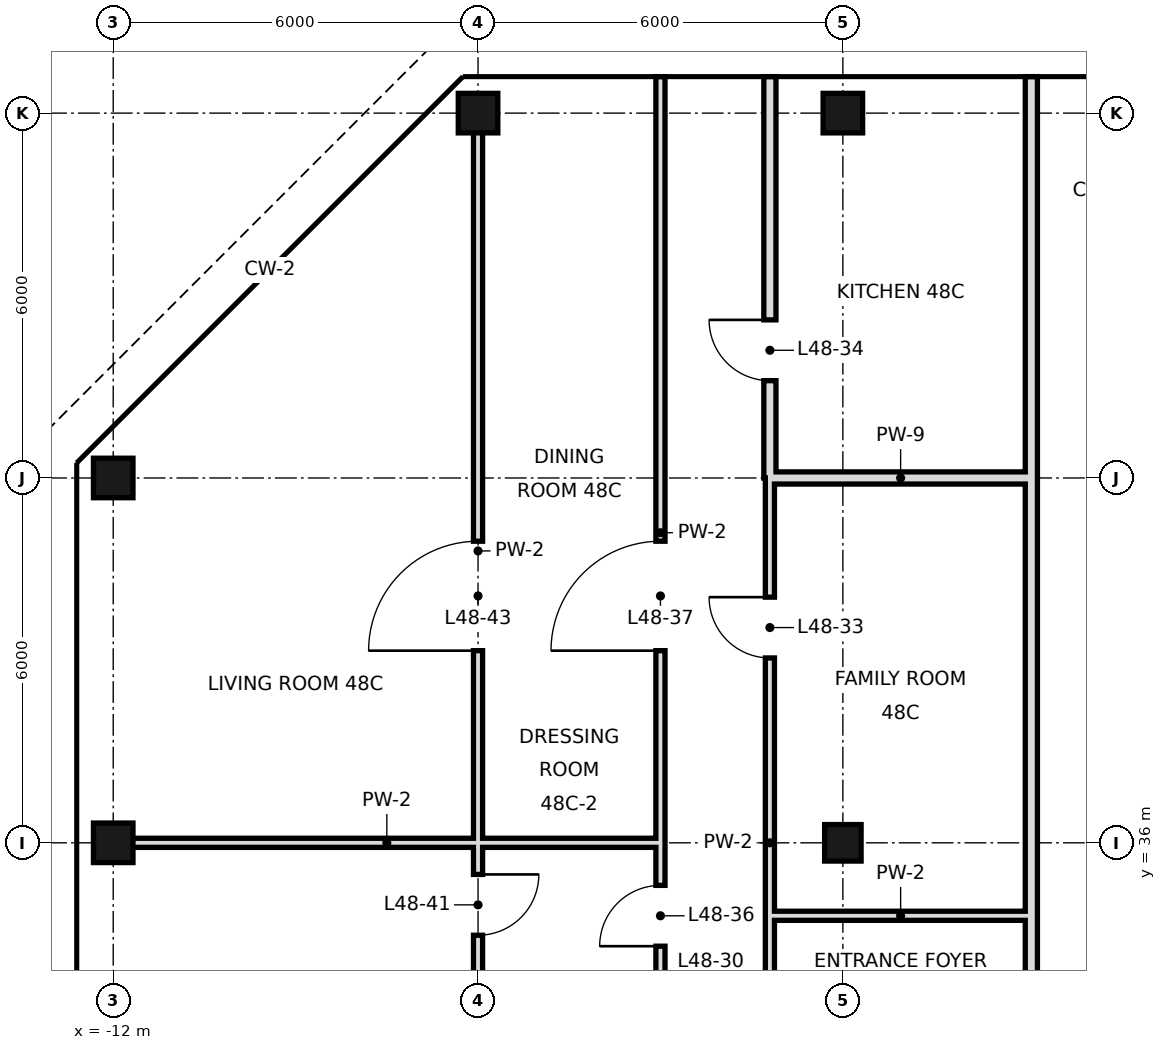
"""IFC4 building model, lengths in metres.
Left out: names, types, materials, properties, quantities, classifications, styles, units other than length and angle.
Written with IfcOpenShell. Run it as: python <this file> out.ifc"""

import sys

from ifc_helpers import new_model, si_unit, direction, frame, frame_2d, origin, origin_2d, place, context, subcontext, project, spatial, rectangle, hollow_rectangle, extrude, element, fill, save


model = new_model("IFC4")
c1 = context("Model", 3, precision=1e-05, world=origin(), true_north=direction((0.0, 1.0)))
c2 = subcontext(c1, "Body", "Model", "MODEL_VIEW")
j1 = project(units=[si_unit("LENGTHUNIT", "METRE"), si_unit("PLANEANGLEUNIT", "RADIAN")], contexts=[c1])
p1 = place(None, origin())
s1 = spatial("IfcSite", under=j1, at=p1, CompositionType="ELEMENT")
p2 = place(p1, origin())
s2 = spatial("IfcBuilding", under=s1, at=p2, CompositionType="ELEMENT")
p3 = place(p2, frame((0.0, 0.0, 206.4)))
s3 = spatial("IfcBuildingStorey", under=s2, at=p3, CompositionType="ELEMENT", Elevation=206.4)
for number, where, z_axis, x_axis in (
    (1, (-12.0, 36.0, 0.0), (0.0, 0.0, 1.0), (1.0, 0.0, 0.0)),
    (2, (-12.0, 42.0, 0.0), (0.0, 0.0, 1.0), (1.0, 0.0, 0.0)),
    (3, (-6.0, 48.0, 0.0), (0.0, 0.0, 1.0), (1.0, 0.0, 0.0)),
):
    element("IfcColumn", number, at=place(p3, frame(where, z_axis=z_axis, x_axis=x_axis)), inside=s3, PredefinedType="COLUMN", context=c2, shape_type="SweptSolid", body=[
        extrude(hollow_rectangle(XDim=0.65, YDim=0.65, WallThickness=0.032, at=origin_2d()), origin(), (0.0, 0.0, 1.0), 3.6),
    ])
p4 = place(p3, frame((0.0, 36.0, 0.0), z_axis=(0.0, 0.0, 1.0), x_axis=(1.0, 0.0, 0.0)))
e4 = element("IfcColumn", 4, at=p4, inside=s3, PredefinedType="COLUMN", context=c2, shape_type="SweptSolid", body=[
    extrude(hollow_rectangle(XDim=0.6, YDim=0.6, WallThickness=0.028, at=origin_2d()), origin(), (0.0, 0.0, 1.0), 3.6),
])
p5 = place(p3, frame((0.0, 48.0, 0.0), z_axis=(0.0, 0.0, 1.0), x_axis=(1.0, 0.0, 0.0)))
e5 = element("IfcColumn", 5, at=p5, inside=s3, PredefinedType="COLUMN", context=c2, shape_type="SweptSolid", body=[
    extrude(hollow_rectangle(XDim=0.65, YDim=0.65, WallThickness=0.032, at=origin_2d()), origin(), (0.0, 0.0, 1.0), 3.6),
])
p6 = place(p3, frame((-1.2, 42.0, 0.0), z_axis=(0.0, 0.0, 1.0), x_axis=(0.0, 1.0, 0.0)))
e6 = element("IfcWall", 6, at=p6, inside=s3, PredefinedType="SOLIDWALL", context=c2, shape_type="SweptSolid", body=[
    extrude(rectangle(XDim=6.6, YDim=0.2, at=frame_2d((3.3, 0.0))), origin(), (0.0, 0.0, 1.0), 2.68),
])
p7 = place(p6, frame((1.6, 0.0, 0.0)))
e7 = element("IfcOpeningElement", 7, at=p7, cuts=e6, PredefinedType="OPENING", context=c2, shape_type="SweptSolid", body=[
    extrude(rectangle(XDim=1.0, YDim=2.4, at=frame_2d((0.5, 1.2))), frame((0.0, 0.11, 0.0), z_axis=(0.0, -1.0, 0.0), x_axis=(1.0, 0.0, 0.0)), (0.0, 0.0, 1.0), 0.22),
])
p8 = place(p3, frame((-1.2, 30.0, 0.0), z_axis=(0.0, 0.0, 1.0), x_axis=(0.0, 1.0, 0.0)))
e8 = element("IfcWall", 8, at=p8, inside=s3, PredefinedType="PARTITIONING", context=c2, shape_type="SweptSolid", body=[
    extrude(rectangle(XDim=12.0, YDim=0.15, at=frame_2d((6.0, 0.0))), origin(), (0.0, 0.0, 1.0), 3.38),
])
p9 = place(p8, frame((2.56, 0.0, 0.0)))
e9 = element("IfcOpeningElement", 9, at=p9, cuts=e8, PredefinedType="OPENING", context=c2, shape_type="SweptSolid", body=[
    extrude(rectangle(XDim=1.0, YDim=2.4, at=frame_2d((0.5, 1.2))), frame((0.0, 0.085, 0.0), z_axis=(0.0, -1.0, 0.0), x_axis=(1.0, 0.0, 0.0)), (0.0, 0.0, 1.0), 0.17),
])
p10 = place(p8, frame((9.04, 0.0, 0.0)))
e10 = element("IfcOpeningElement", 10, at=p10, cuts=e8, PredefinedType="OPENING", context=c2, shape_type="SweptSolid", body=[
    extrude(rectangle(XDim=1.0, YDim=2.4, at=frame_2d((0.5, 1.2))), frame((0.0, 0.085, 0.0), z_axis=(0.0, -1.0, 0.0), x_axis=(1.0, 0.0, 0.0)), (0.0, 0.0, 1.0), 0.17),
])
p11 = place(p3, frame((-3.0, 33.6, 0.0), z_axis=(0.0, 0.0, 1.0), x_axis=(0.0, 1.0, 0.0)))
e11 = element("IfcWall", 11, at=p11, inside=s3, PredefinedType="PARTITIONING", context=c2, shape_type="SweptSolid", body=[
    extrude(rectangle(XDim=15.0, YDim=0.15, at=frame_2d((7.5, 0.0))), origin(), (0.0, 0.0, 1.0), 3.38),
])
p12 = place(p11, frame((0.7, 0.0, 0.0)))
e12 = element("IfcOpeningElement", 12, at=p12, cuts=e11, PredefinedType="OPENING", context=c2, shape_type="SweptSolid", body=[
    extrude(rectangle(XDim=1.0, YDim=2.4, at=frame_2d((0.5, 1.2))), frame((0.0, 0.085, 0.0), z_axis=(0.0, -1.0, 0.0), x_axis=(1.0, 0.0, 0.0)), (0.0, 0.0, 1.0), 0.17),
])
p13 = place(p11, frame((5.56, 0.0, 0.0)))
e13 = element("IfcOpeningElement", 13, at=p13, cuts=e11, PredefinedType="OPENING", context=c2, shape_type="SweptSolid", body=[
    extrude(rectangle(XDim=1.8, YDim=2.4, at=frame_2d((0.9, 1.2))), frame((0.0, 0.085, 0.0), z_axis=(0.0, -1.0, 0.0), x_axis=(1.0, 0.0, 0.0)), (0.0, 0.0, 1.0), 0.17),
])
p14 = place(p3, frame((-6.0, 33.6, 0.0), z_axis=(0.0, 0.0, 1.0), x_axis=(0.0, 1.0, 0.0)))
e14 = element("IfcWall", 14, at=p14, inside=s3, PredefinedType="PARTITIONING", context=c2, shape_type="SweptSolid", body=[
    extrude(rectangle(XDim=14.4, YDim=0.15, at=frame_2d((7.2, 0.0))), origin(), (0.0, 0.0, 1.0), 3.38),
])
p15 = place(p14, frame((0.88, 0.0, 0.0)))
e15 = element("IfcOpeningElement", 15, at=p15, cuts=e14, PredefinedType="OPENING", context=c2, shape_type="SweptSolid", body=[
    extrude(rectangle(XDim=1.0, YDim=2.4, at=frame_2d((0.5, 1.2))), frame((0.0, 0.085, 0.0), z_axis=(0.0, -1.0, 0.0), x_axis=(1.0, 0.0, 0.0)), (0.0, 0.0, 1.0), 0.17),
])
p16 = place(p14, frame((5.56, 0.0, 0.0)))
e16 = element("IfcOpeningElement", 16, at=p16, cuts=e14, PredefinedType="OPENING", context=c2, shape_type="SweptSolid", body=[
    extrude(rectangle(XDim=1.8, YDim=2.4, at=frame_2d((0.9, 1.2))), frame((0.0, 0.085, 0.0), z_axis=(0.0, -1.0, 0.0), x_axis=(1.0, 0.0, 0.0)), (0.0, 0.0, 1.0), 0.17),
])
p17 = place(p3, frame((3.1, 15.3, 0.0), z_axis=(0.0, 0.0, 1.0), x_axis=(0.0, 1.0, 0.0)))
e17 = element("IfcWall", 17, at=p17, inside=s3, PredefinedType="SOLIDWALL", context=c2, shape_type="SweptSolid", body=[
    extrude(rectangle(XDim=26.7, YDim=0.2, at=frame_2d((13.35, 0.0))), origin(), (0.0, 0.0, 1.0), 2.93),
])
p18 = place(p17, frame((16.5, 0.0, 0.0)))
e18 = element("IfcOpeningElement", 18, at=p18, cuts=e17, PredefinedType="OPENING", context=c2, shape_type="SweptSolid", body=[
    extrude(rectangle(XDim=1.2, YDim=2.4, at=frame_2d((0.6, 1.2))), frame((0.0, 0.11, 0.0), z_axis=(0.0, -1.0, 0.0), x_axis=(1.0, 0.0, 0.0)), (0.0, 0.0, 1.0), 0.22),
])
p19 = place(p3, frame((3.1, 42.0, 0.0), z_axis=(0.0, 0.0, 1.0), x_axis=(0.0, 1.0, 0.0)))
e19 = element("IfcWall", 19, at=p19, inside=s3, PredefinedType="SOLIDWALL", context=c2, shape_type="SweptSolid", body=[
    extrude(rectangle(XDim=6.6, YDim=0.2, at=frame_2d((3.3, 0.0))), origin(), (0.0, 0.0, 1.0), 2.68),
])
p20 = place(p3, frame((-1.2, 34.8, 0.0), z_axis=(0.0, 0.0, 1.0), x_axis=(1.0, 0.0, 0.0)))
e20 = element("IfcWall", 20, at=p20, inside=s3, PredefinedType="PARTITIONING", context=c2, shape_type="SweptSolid", body=[
    extrude(rectangle(XDim=4.3, YDim=0.15, at=frame_2d((2.15, 0.0))), origin(), (0.0, 0.0, 1.0), 3.38),
])
p21 = place(p3, frame((-12.0, 36.0, 0.0), z_axis=(0.0, 0.0, 1.0), x_axis=(1.0, 0.0, 0.0)))
e21 = element("IfcWall", 21, at=p21, inside=s3, PredefinedType="PARTITIONING", context=c2, shape_type="SweptSolid", body=[
    extrude(rectangle(XDim=9.0, YDim=0.15, at=frame_2d((4.5, 0.0))), origin(), (0.0, 0.0, 1.0), 2.68),
])
p22 = place(p3, frame((-1.2, 42.0, 0.0), z_axis=(0.0, 0.0, 1.0), x_axis=(1.0, 0.0, 0.0)))
e22 = element("IfcWall", 22, at=p22, inside=s3, PredefinedType="SOLIDWALL", context=c2, shape_type="SweptSolid", body=[
    extrude(rectangle(XDim=4.3, YDim=0.2, at=frame_2d((2.15, 0.0))), origin(), (0.0, 0.0, 1.0), 2.68),
])
p23 = place(p10, frame((1.0, 0.0, 0.0), z_axis=(0.0, 0.0, 1.0), x_axis=(-1.0, 0.0, 0.0)))
e23 = element("IfcDoor", 23, at=p23, inside=s3, OperationType="SINGLE_SWING_LEFT", PredefinedType="DOOR", context=c2, shape_type="SweptSolid", body=[
    extrude(rectangle(XDim=1.0, YDim=2.4, at=frame_2d((0.5, 1.2))), frame((0.0, 0.025, 0.0), z_axis=(0.0, -1.0, 0.0), x_axis=(1.0, 0.0, 0.0)), (0.0, 0.0, 1.0), 0.05),
])
fill(e10, e23)
p24 = place(p7, frame((1.0, 0.0, 0.0), z_axis=(0.0, 0.0, 1.0), x_axis=(-1.0, 0.0, 0.0)))
e24 = element("IfcDoor", 24, at=p24, inside=s3, OperationType="SINGLE_SWING_LEFT", PredefinedType="DOOR", context=c2, shape_type="SweptSolid", body=[
    extrude(rectangle(XDim=1.0, YDim=2.4, at=frame_2d((0.5, 1.2))), frame((0.0, 0.025, 0.0), z_axis=(0.0, -1.0, 0.0), x_axis=(1.0, 0.0, 0.0)), (0.0, 0.0, 1.0), 0.05),
])
fill(e7, e24)
p25 = place(p12, origin())
e25 = element("IfcDoor", 25, at=p25, inside=s3, OperationType="SINGLE_SWING_LEFT", PredefinedType="DOOR", context=c2, shape_type="SweptSolid", body=[
    extrude(rectangle(XDim=1.0, YDim=2.4, at=frame_2d((0.5, 1.2))), frame((0.0, 0.025, 0.0), z_axis=(0.0, -1.0, 0.0), x_axis=(1.0, 0.0, 0.0)), (0.0, 0.0, 1.0), 0.05),
])
fill(e12, e25)
p26 = place(p13, origin())
e26 = element("IfcDoor", 26, at=p26, inside=s3, OperationType="SINGLE_SWING_LEFT", PredefinedType="DOOR", context=c2, shape_type="SweptSolid", body=[
    extrude(rectangle(XDim=1.8, YDim=2.4, at=frame_2d((0.9, 1.2))), frame((0.0, 0.025, 0.0), z_axis=(0.0, -1.0, 0.0), x_axis=(1.0, 0.0, 0.0)), (0.0, 0.0, 1.0), 0.05),
])
fill(e13, e26)
p27 = place(p15, origin())
e27 = element("IfcDoor", 27, at=p27, inside=s3, OperationType="SINGLE_SWING_RIGHT", PredefinedType="DOOR", context=c2, shape_type="SweptSolid", body=[
    extrude(rectangle(XDim=1.0, YDim=2.4, at=frame_2d((0.5, 1.2))), frame((0.0, 0.025, 0.0), z_axis=(0.0, -1.0, 0.0), x_axis=(1.0, 0.0, 0.0)), (0.0, 0.0, 1.0), 0.05),
])
fill(e15, e27)
p28 = place(p16, origin())
e28 = element("IfcDoor", 28, at=p28, inside=s3, OperationType="SINGLE_SWING_LEFT", PredefinedType="DOOR", context=c2, shape_type="SweptSolid", body=[
    extrude(rectangle(XDim=1.8, YDim=2.4, at=frame_2d((0.9, 1.2))), frame((0.0, 0.025, 0.0), z_axis=(0.0, -1.0, 0.0), x_axis=(1.0, 0.0, 0.0)), (0.0, 0.0, 1.0), 0.05),
])
fill(e16, e28)
save(model, sys.argv[1])
